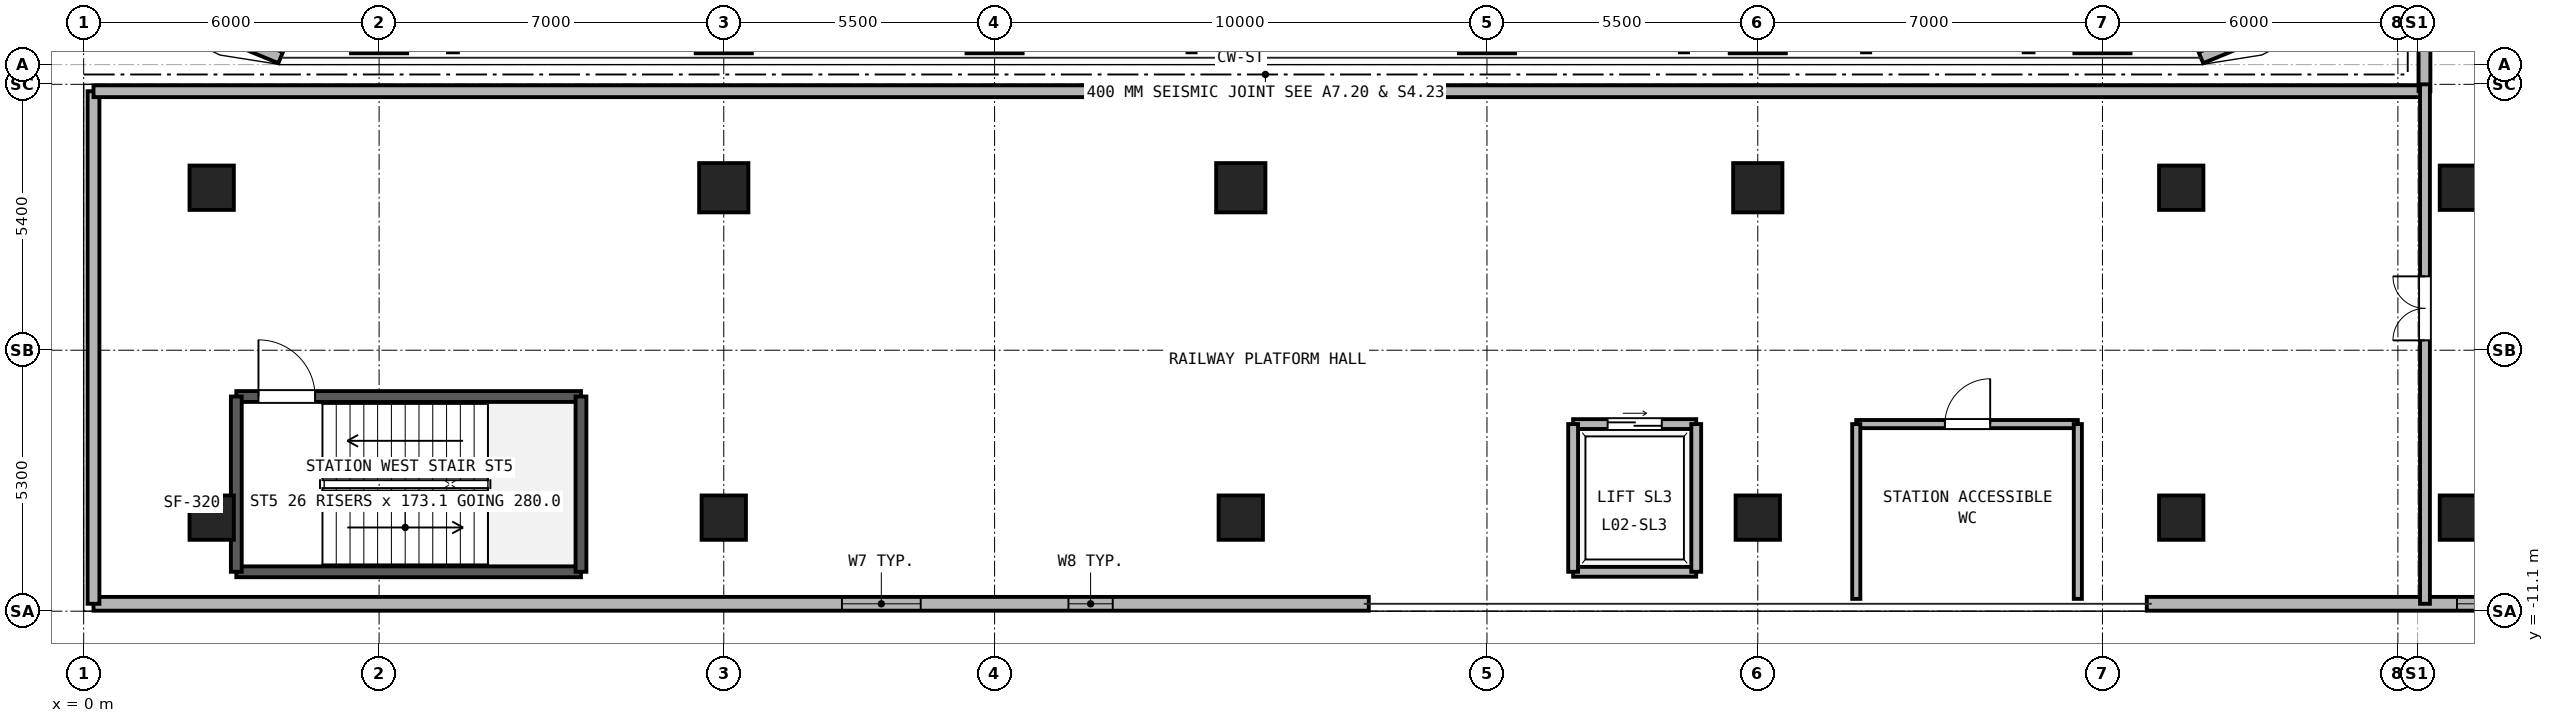
"""IFC4 building model, lengths in metres.
Left out: names, types, materials, properties, quantities, classifications, styles, units other than length and angle.
Written with IfcOpenShell. Run it as: python <this file> out.ifc"""

import sys

from ifc_helpers import new_model, si_unit, direction, frame, frame_2d, origin, origin_2d, place, context, subcontext, project, spatial, rectangle, hollow_rectangle, circle, extrude, source, transform, mapped, element, fill, save


model = new_model("IFC4")
c1 = context("Model", 3, precision=1e-05, world=origin(), true_north=direction((0.0, 1.0)))
c2 = subcontext(c1, "Body", "Model", "MODEL_VIEW")
j1 = project(units=[si_unit("LENGTHUNIT", "METRE"), si_unit("PLANEANGLEUNIT", "RADIAN")], contexts=[c1])
p1 = place(None, origin())
s1 = spatial("IfcSite", under=j1, at=p1, CompositionType="ELEMENT")
p2 = place(p1, origin())
s2 = spatial("IfcBuilding", under=s1, at=p2, CompositionType="ELEMENT")
p3 = place(p2, frame((0.0, 0.0, 9.0)))
s3 = spatial("IfcBuildingStorey", under=s2, at=p3, CompositionType="ELEMENT", Elevation=9.0)
m1 = source(origin(), c2, "Body", "SweptSolid", [
    extrude(hollow_rectangle(XDim=1.14, YDim=1.14, WallThickness=0.07, at=origin_2d()), origin(), (0.0, 0.0, 1.0), 4.18),
])
for number, where, z_axis, x_axis in (
    (1, (6.0, 0.8, 0.0), (0.0, 0.0, 1.0), (1.0, 0.0, 0.0)),
    (2, (13.0, 0.8, 0.0), (0.0, 0.0, 1.0), (1.0, 0.0, 0.0)),
    (3, (18.5, 0.8, 0.0), (0.0, 0.0, 1.0), (1.0, 0.0, 0.0)),
    (4, (28.5, 0.8, 0.0), (0.0, 0.0, 1.0), (1.0, 0.0, 0.0)),
    (5, (34.0, 0.8, 0.0), (0.0, 0.0, 1.0), (1.0, 0.0, 0.0)),
    (6, (41.0, 0.8, 0.0), (0.0, 0.0, 1.0), (1.0, 0.0, 0.0)),
):
    element("IfcColumn", number, at=place(p3, frame(where, z_axis=z_axis, x_axis=x_axis)), inside=s3, PredefinedType="COLUMN", context=c2, shape_type="MappedRepresentation", body=[
        mapped(m1, transform((0.0, 0.0, 0.0), x_axis=(1.0, 0.0, 0.0), y_axis=(0.0, 1.0, 0.0), z_axis=(0.0, 0.0, 1.0), scale=1.0)),
    ])
m2 = source(origin(), c2, "Body", "SweptSolid", [
    extrude(hollow_rectangle(XDim=0.7, YDim=0.9, WallThickness=0.04, at=origin_2d()), origin(), (0.0, 0.0, 1.0), 4.18),
])
for number, where, z_axis, x_axis in (
    (7, (2.6, -9.2, 0.0), (0.0, 0.0, 1.0), (1.0, 0.0, 0.0)),
    (8, (2.6, -2.5, 0.0), (0.0, 0.0, 1.0), (1.0, 0.0, 0.0)),
    (9, (13.0, -9.2, 0.0), (0.0, 0.0, 1.0), (1.0, 0.0, 0.0)),
):
    element("IfcColumn", number, at=place(p3, frame(where, z_axis=z_axis, x_axis=x_axis)), inside=s3, PredefinedType="COLUMN", context=c2, shape_type="MappedRepresentation", body=[
        mapped(m2, transform((0.0, 0.0, 0.0), x_axis=(1.0, 0.0, 0.0), y_axis=(0.0, 1.0, 0.0), z_axis=(0.0, 0.0, 1.0), scale=1.0)),
    ])
m3 = source(origin(), c2, "Body", "SweptSolid", [
    extrude(circle(Radius=0.5, at=origin_2d()), origin(), (0.0, 0.0, 1.0), 4.18),
])
p4 = place(p3, frame((13.0, -2.5, 0.0), z_axis=(0.0, 0.0, 1.0), x_axis=(1.0, 0.0, 0.0)))
e10 = element("IfcColumn", 10, at=p4, inside=s3, PredefinedType="COLUMN", context=c2, shape_type="MappedRepresentation", body=[
    mapped(m3, transform((0.0, 0.0, 0.0), x_axis=(1.0, 0.0, 0.0), y_axis=(0.0, 1.0, 0.0), z_axis=(0.0, 0.0, 1.0), scale=1.0)),
])
p5 = place(p3, frame((23.5, -9.2, 0.0), z_axis=(0.0, 0.0, 1.0), x_axis=(1.0, 0.0, 0.0)))
e11 = element("IfcColumn", 11, at=p5, inside=s3, PredefinedType="COLUMN", context=c2, shape_type="MappedRepresentation", body=[
    mapped(m2, transform((0.0, 0.0, 0.0), x_axis=(1.0, 0.0, 0.0), y_axis=(0.0, 1.0, 0.0), z_axis=(0.0, 0.0, 1.0), scale=1.0)),
])
p6 = place(p3, frame((23.5, -2.5, 0.0), z_axis=(0.0, 0.0, 1.0), x_axis=(1.0, 0.0, 0.0)))
e12 = element("IfcColumn", 12, at=p6, inside=s3, PredefinedType="COLUMN", context=c2, shape_type="MappedRepresentation", body=[
    mapped(m3, transform((0.0, 0.0, 0.0), x_axis=(1.0, 0.0, 0.0), y_axis=(0.0, 1.0, 0.0), z_axis=(0.0, 0.0, 1.0), scale=1.0)),
])
p7 = place(p3, frame((34.0, -9.2, 0.0), z_axis=(0.0, 0.0, 1.0), x_axis=(1.0, 0.0, 0.0)))
e13 = element("IfcColumn", 13, at=p7, inside=s3, PredefinedType="COLUMN", context=c2, shape_type="MappedRepresentation", body=[
    mapped(m2, transform((0.0, 0.0, 0.0), x_axis=(1.0, 0.0, 0.0), y_axis=(0.0, 1.0, 0.0), z_axis=(0.0, 0.0, 1.0), scale=1.0)),
])
p8 = place(p3, frame((34.0, -2.5, 0.0), z_axis=(0.0, 0.0, 1.0), x_axis=(1.0, 0.0, 0.0)))
e14 = element("IfcColumn", 14, at=p8, inside=s3, PredefinedType="COLUMN", context=c2, shape_type="MappedRepresentation", body=[
    mapped(m3, transform((0.0, 0.0, 0.0), x_axis=(1.0, 0.0, 0.0), y_axis=(0.0, 1.0, 0.0), z_axis=(0.0, 0.0, 1.0), scale=1.0)),
])
for number, where, z_axis, x_axis in (
    (15, (42.6, -9.2, 0.0), (0.0, 0.0, 1.0), (1.0, 0.0, 0.0)),
    (16, (42.6, -2.5, 0.0), (0.0, 0.0, 1.0), (1.0, 0.0, 0.0)),
    (17, (48.3, -9.2, 0.0), (0.0, 0.0, 1.0), (1.0, 0.0, 0.0)),
    (18, (48.3, -2.5, 0.0), (0.0, 0.0, 1.0), (1.0, 0.0, 0.0)),
):
    element("IfcColumn", number, at=place(p3, frame(where, z_axis=z_axis, x_axis=x_axis)), inside=s3, PredefinedType="COLUMN", context=c2, shape_type="MappedRepresentation", body=[
        mapped(m2, transform((0.0, 0.0, 0.0), x_axis=(1.0, 0.0, 0.0), y_axis=(0.0, 1.0, 0.0), z_axis=(0.0, 0.0, 1.0), scale=1.0)),
    ])
for number, where, z_axis, x_axis in (
    (19, (43.0, 0.14, 0.0), (0.0, 0.0, 1.0), (0.924, 0.383, 0.0)),
    (20, (1.271, 1.271, 0.0), (0.0, 0.0, 1.0), (0.924, -0.383, 0.0)),
):
    element("IfcWall", number, at=place(p3, frame(where, z_axis=z_axis, x_axis=x_axis)), inside=s3, PredefinedType="SOLIDWALL", context=c2, shape_type="SweptSolid", body=[
        extrude(rectangle(XDim=2.954, YDim=0.24, at=frame_2d((1.477, 0.0))), origin(), (0.0, 0.0, 1.0), 4.18),
    ])
p9 = place(p3, frame((0.2, -10.95, 0.0), z_axis=(0.0, 0.0, 1.0), x_axis=(1.0, 0.0, 0.0)))
e21 = element("IfcWall", 21, at=p9, inside=s3, PredefinedType="SOLIDWALL", context=c2, shape_type="SweptSolid", body=[
    extrude(rectangle(XDim=25.9, YDim=0.28, at=frame_2d((12.95, 0.0))), origin(), (0.0, 0.0, 1.0), 4.18),
])
p10 = place(p9, frame((15.2, 0.0, 1.1)))
e22 = element("IfcOpeningElement", 22, at=p10, cuts=e21, PredefinedType="OPENING", context=c2, shape_type="SweptSolid", body=[
    extrude(rectangle(XDim=1.6, YDim=1.4, at=frame_2d((0.8, 0.7))), frame((0.0, 0.15, 0.0), z_axis=(0.0, -1.0, 0.0), x_axis=(1.0, 0.0, 0.0)), (0.0, 0.0, 1.0), 0.3),
])
p11 = place(p9, frame((19.8, 0.0, 1.1)))
e23 = element("IfcOpeningElement", 23, at=p11, cuts=e21, PredefinedType="OPENING", context=c2, shape_type="SweptSolid", body=[
    extrude(rectangle(XDim=0.9, YDim=1.5, at=frame_2d((0.45, 0.75))), frame((0.0, 0.15, 0.0), z_axis=(0.0, -1.0, 0.0), x_axis=(1.0, 0.0, 0.0)), (0.0, 0.0, 1.0), 0.3),
])
p12 = place(p3, frame((41.9, -10.95, 0.0), z_axis=(0.0, 0.0, 1.0), x_axis=(1.0, 0.0, 0.0)))
e24 = element("IfcWall", 24, at=p12, inside=s3, PredefinedType="SOLIDWALL", context=c2, shape_type="SweptSolid", body=[
    extrude(rectangle(XDim=29.55, YDim=0.28, at=frame_2d((14.775, 0.0))), origin(), (0.0, 0.0, 1.0), 4.18),
])
p13 = place(p12, frame((6.3, 0.0, 1.1)))
e25 = element("IfcOpeningElement", 25, at=p13, cuts=e24, PredefinedType="OPENING", context=c2, shape_type="SweptSolid", body=[
    extrude(rectangle(XDim=1.6, YDim=1.4, at=frame_2d((0.8, 0.7))), frame((0.0, 0.15, 0.0), z_axis=(0.0, -1.0, 0.0), x_axis=(1.0, 0.0, 0.0)), (0.0, 0.0, 1.0), 0.3),
])
p14 = place(p3, frame((0.2, -10.95, 0.0), z_axis=(0.0, 0.0, 1.0), x_axis=(0.0, 1.0, 0.0)))
e26 = element("IfcWall", 26, at=p14, inside=s3, PredefinedType="SOLIDWALL", context=c2, shape_type="SweptSolid", body=[
    extrude(rectangle(XDim=10.41, YDim=0.24, at=frame_2d((5.205, 0.0))), origin(), (0.0, 0.0, 1.0), 4.18),
])
p15 = place(p3, frame((0.2, -0.54, 0.0), z_axis=(0.0, 0.0, 1.0), x_axis=(1.0, 0.0, 0.0)))
e27 = element("IfcWall", 27, at=p15, inside=s3, PredefinedType="SOLIDWALL", context=c2, shape_type="SweptSolid", body=[
    extrude(rectangle(XDim=47.34, YDim=0.24, at=frame_2d((23.67, 0.0))), origin(), (0.0, 0.0, 1.0), 4.18),
])
p16 = place(p3, frame((47.54, -0.54, 0.0), z_axis=(0.0, 0.0, 1.0), x_axis=(0.0, 1.0, 0.0)))
e28 = element("IfcWall", 28, at=p16, inside=s3, PredefinedType="SOLIDWALL", context=c2, shape_type="SweptSolid", body=[
    extrude(rectangle(XDim=40.89, YDim=0.24, at=frame_2d((20.445, 0.0))), origin(), (0.0, 0.0, 1.0), 4.18),
])
p17 = place(p3, frame((3.1, -10.3, 0.0), z_axis=(0.0, 0.0, 1.0), x_axis=(1.0, 0.0, 0.0)))
e29 = element("IfcWall", 29, at=p17, inside=s3, PredefinedType="SOLIDWALL", context=c2, shape_type="SweptSolid", body=[
    extrude(rectangle(XDim=7.0, YDim=0.22, at=frame_2d((3.5, 0.0))), origin(), (0.0, 0.0, 1.0), 4.18),
])
p18 = place(p3, frame((3.1, -6.74, 0.0), z_axis=(0.0, 0.0, 1.0), x_axis=(1.0, 0.0, 0.0)))
e30 = element("IfcWall", 30, at=p18, inside=s3, PredefinedType="SOLIDWALL", context=c2, shape_type="SweptSolid", body=[
    extrude(rectangle(XDim=7.0, YDim=0.22, at=frame_2d((3.5, 0.0))), origin(), (0.0, 0.0, 1.0), 4.18),
])
p19 = place(p18, frame((0.45, 0.0, 0.0)))
e31 = element("IfcOpeningElement", 31, at=p19, cuts=e30, PredefinedType="OPENING", context=c2, shape_type="SweptSolid", body=[
    extrude(rectangle(XDim=1.15, YDim=2.2, at=frame_2d((0.575, 1.1))), frame((0.0, 0.12, 0.0), z_axis=(0.0, -1.0, 0.0), x_axis=(1.0, 0.0, 0.0)), (0.0, 0.0, 1.0), 0.24),
])
for number, where, z_axis, x_axis in (
    (32, (3.1, -10.3, 0.0), (0.0, 0.0, 1.0), (0.0, 1.0, 0.0)),
    (33, (10.1, -10.3, 0.0), (0.0, 0.0, 1.0), (0.0, 1.0, 0.0)),
):
    element("IfcWall", number, at=place(p3, frame(where, z_axis=z_axis, x_axis=x_axis)), inside=s3, PredefinedType="SOLIDWALL", context=c2, shape_type="SweptSolid", body=[
        extrude(rectangle(XDim=3.56, YDim=0.22, at=frame_2d((1.78, 0.0))), origin(), (0.0, 0.0, 1.0), 4.18),
    ])
p20 = place(p3, frame((30.25, -10.3, 0.0), z_axis=(0.0, 0.0, 1.0), x_axis=(1.0, 0.0, 0.0)))
e34 = element("IfcWall", 34, at=p20, inside=s3, PredefinedType="PARTITIONING", context=c2, shape_type="SweptSolid", body=[
    extrude(rectangle(XDim=2.5, YDim=0.2, at=frame_2d((1.25, 0.0))), origin(), (0.0, 0.0, 1.0), 4.18),
])
p21 = place(p3, frame((30.25, -7.3, 0.0), z_axis=(0.0, 0.0, 1.0), x_axis=(1.0, 0.0, 0.0)))
e35 = element("IfcWall", 35, at=p21, inside=s3, PredefinedType="PARTITIONING", context=c2, shape_type="SweptSolid", body=[
    extrude(rectangle(XDim=2.5, YDim=0.2, at=frame_2d((1.25, 0.0))), origin(), (0.0, 0.0, 1.0), 4.18),
])
p22 = place(p21, frame((0.7, 0.0, 0.0)))
e36 = element("IfcOpeningElement", 36, at=p22, cuts=e35, PredefinedType="OPENING", context=c2, shape_type="SweptSolid", body=[
    extrude(rectangle(XDim=1.1, YDim=2.25, at=frame_2d((0.55, 1.125))), frame((0.0, 0.11, 0.0), z_axis=(0.0, -1.0, 0.0), x_axis=(1.0, 0.0, 0.0)), (0.0, 0.0, 1.0), 0.22),
])
for number, where, z_axis, x_axis in (
    (37, (30.25, -10.3, 0.0), (0.0, 0.0, 1.0), (0.0, 1.0, 0.0)),
    (38, (32.75, -10.3, 0.0), (0.0, 0.0, 1.0), (0.0, 1.0, 0.0)),
):
    element("IfcWall", number, at=place(p3, frame(where, z_axis=z_axis, x_axis=x_axis)), inside=s3, PredefinedType="PARTITIONING", context=c2, shape_type="SweptSolid", body=[
        extrude(rectangle(XDim=3.0, YDim=0.2, at=frame_2d((1.5, 0.0))), origin(), (0.0, 0.0, 1.0), 4.18),
    ])
p23 = place(p3, frame((47.55, -10.95, 0.0), z_axis=(0.0, 0.0, 1.0), x_axis=(0.0, 1.0, 0.0)))
e39 = element("IfcWall", 39, at=p23, inside=s3, PredefinedType="PARTITIONING", context=c2, shape_type="SweptSolid", body=[
    extrude(rectangle(XDim=10.55, YDim=0.2, at=frame_2d((5.275, 0.0))), origin(), (0.0, 0.0, 1.0), 4.18),
])
p24 = place(p23, frame((5.35, 0.0, 0.0)))
e40 = element("IfcOpeningElement", 40, at=p24, cuts=e39, PredefinedType="OPENING", context=c2, shape_type="SweptSolid", body=[
    extrude(rectangle(XDim=1.3, YDim=2.2, at=frame_2d((0.65, 1.1))), frame((0.0, 0.11, 0.0), z_axis=(0.0, -1.0, 0.0), x_axis=(1.0, 0.0, 0.0)), (0.0, 0.0, 1.0), 0.22),
])
p25 = place(p3, frame((36.0, -7.3, 0.0), z_axis=(0.0, 0.0, 1.0), x_axis=(1.0, 0.0, 0.0)))
e41 = element("IfcWall", 41, at=p25, inside=s3, PredefinedType="PARTITIONING", context=c2, shape_type="SweptSolid", body=[
    extrude(rectangle(XDim=4.5, YDim=0.165, at=frame_2d((2.25, 0.0))), origin(), (0.0, 0.0, 1.0), 4.18),
])
p26 = place(p25, frame((1.8, 0.0, 0.0)))
e42 = element("IfcOpeningElement", 42, at=p26, cuts=e41, PredefinedType="OPENING", context=c2, shape_type="SweptSolid", body=[
    extrude(rectangle(XDim=0.92, YDim=2.1, at=frame_2d((0.46, 1.05))), frame((0.0, 0.093, 0.0), z_axis=(0.0, -1.0, 0.0), x_axis=(1.0, 0.0, 0.0)), (0.0, 0.0, 1.0), 0.185),
])
for number, where, z_axis, x_axis in (
    (43, (36.0, -10.85, 0.0), (0.0, 0.0, 1.0), (0.0, 1.0, 0.0)),
    (44, (40.5, -10.85, 0.0), (0.0, 0.0, 1.0), (0.0, 1.0, 0.0)),
):
    element("IfcWall", number, at=place(p3, frame(where, z_axis=z_axis, x_axis=x_axis)), inside=s3, PredefinedType="PARTITIONING", context=c2, shape_type="SweptSolid", body=[
        extrude(rectangle(XDim=3.55, YDim=0.165, at=frame_2d((1.775, 0.0))), origin(), (0.0, 0.0, 1.0), 4.18),
    ])
p27 = place(p10, origin())
e45 = element("IfcWindow", 45, at=p27, inside=s3, PartitioningType="SINGLE_PANEL", PredefinedType="WINDOW", context=c2, shape_type="SweptSolid", body=[
    extrude(rectangle(XDim=1.6, YDim=1.4, at=frame_2d((0.8, 0.7))), frame((0.0, 0.03, 0.0), z_axis=(0.0, -1.0, 0.0), x_axis=(1.0, 0.0, 0.0)), (0.0, 0.0, 1.0), 0.06),
])
fill(e22, e45)
p28 = place(p11, origin())
e46 = element("IfcWindow", 46, at=p28, inside=s3, PartitioningType="SINGLE_PANEL", PredefinedType="WINDOW", context=c2, shape_type="SweptSolid", body=[
    extrude(rectangle(XDim=0.9, YDim=1.5, at=frame_2d((0.45, 0.75))), frame((0.0, 0.03, 0.0), z_axis=(0.0, -1.0, 0.0), x_axis=(1.0, 0.0, 0.0)), (0.0, 0.0, 1.0), 0.06),
])
fill(e23, e46)
p29 = place(p13, origin())
e47 = element("IfcWindow", 47, at=p29, inside=s3, PartitioningType="SINGLE_PANEL", PredefinedType="WINDOW", context=c2, shape_type="SweptSolid", body=[
    extrude(rectangle(XDim=1.6, YDim=1.4, at=frame_2d((0.8, 0.7))), frame((0.0, 0.03, 0.0), z_axis=(0.0, -1.0, 0.0), x_axis=(1.0, 0.0, 0.0)), (0.0, 0.0, 1.0), 0.06),
])
fill(e25, e47)
p30 = place(p19, origin())
e48 = element("IfcDoor", 48, at=p30, inside=s3, OperationType="SINGLE_SWING_LEFT", PredefinedType="DOOR", context=c2, shape_type="SweptSolid", body=[
    extrude(rectangle(XDim=1.15, YDim=2.2, at=frame_2d((0.575, 1.1))), frame((0.0, 0.025, 0.0), z_axis=(0.0, -1.0, 0.0), x_axis=(1.0, 0.0, 0.0)), (0.0, 0.0, 1.0), 0.05),
])
fill(e31, e48)
p31 = place(p22, origin())
e49 = element("IfcDoor", 49, at=p31, inside=s3, OperationType="DOUBLE_DOOR_SLIDING", PredefinedType="DOOR", context=c2, shape_type="SweptSolid", body=[
    extrude(rectangle(XDim=1.1, YDim=2.25, at=frame_2d((0.55, 1.125))), frame((0.0, 0.025, 0.0), z_axis=(0.0, -1.0, 0.0), x_axis=(1.0, 0.0, 0.0)), (0.0, 0.0, 1.0), 0.05),
])
fill(e36, e49)
p32 = place(p24, origin())
e50 = element("IfcDoor", 50, at=p32, inside=s3, OperationType="DOUBLE_DOOR_SINGLE_SWING", PredefinedType="DOOR", context=c2, shape_type="SweptSolid", body=[
    extrude(rectangle(XDim=1.3, YDim=2.2, at=frame_2d((0.65, 1.1))), frame((0.0, 0.025, 0.0), z_axis=(0.0, -1.0, 0.0), x_axis=(1.0, 0.0, 0.0)), (0.0, 0.0, 1.0), 0.05),
])
fill(e40, e50)
p33 = place(p26, origin())
e51 = element("IfcDoor", 51, at=p33, inside=s3, OperationType="SINGLE_SWING_RIGHT", PredefinedType="DOOR", context=c2, shape_type="SweptSolid", body=[
    extrude(rectangle(XDim=0.92, YDim=2.1, at=frame_2d((0.46, 1.05))), frame((0.0, 0.025, 0.0), z_axis=(0.0, -1.0, 0.0), x_axis=(1.0, 0.0, 0.0)), (0.0, 0.0, 1.0), 0.05),
])
fill(e42, e51)
save(model, sys.argv[1])
